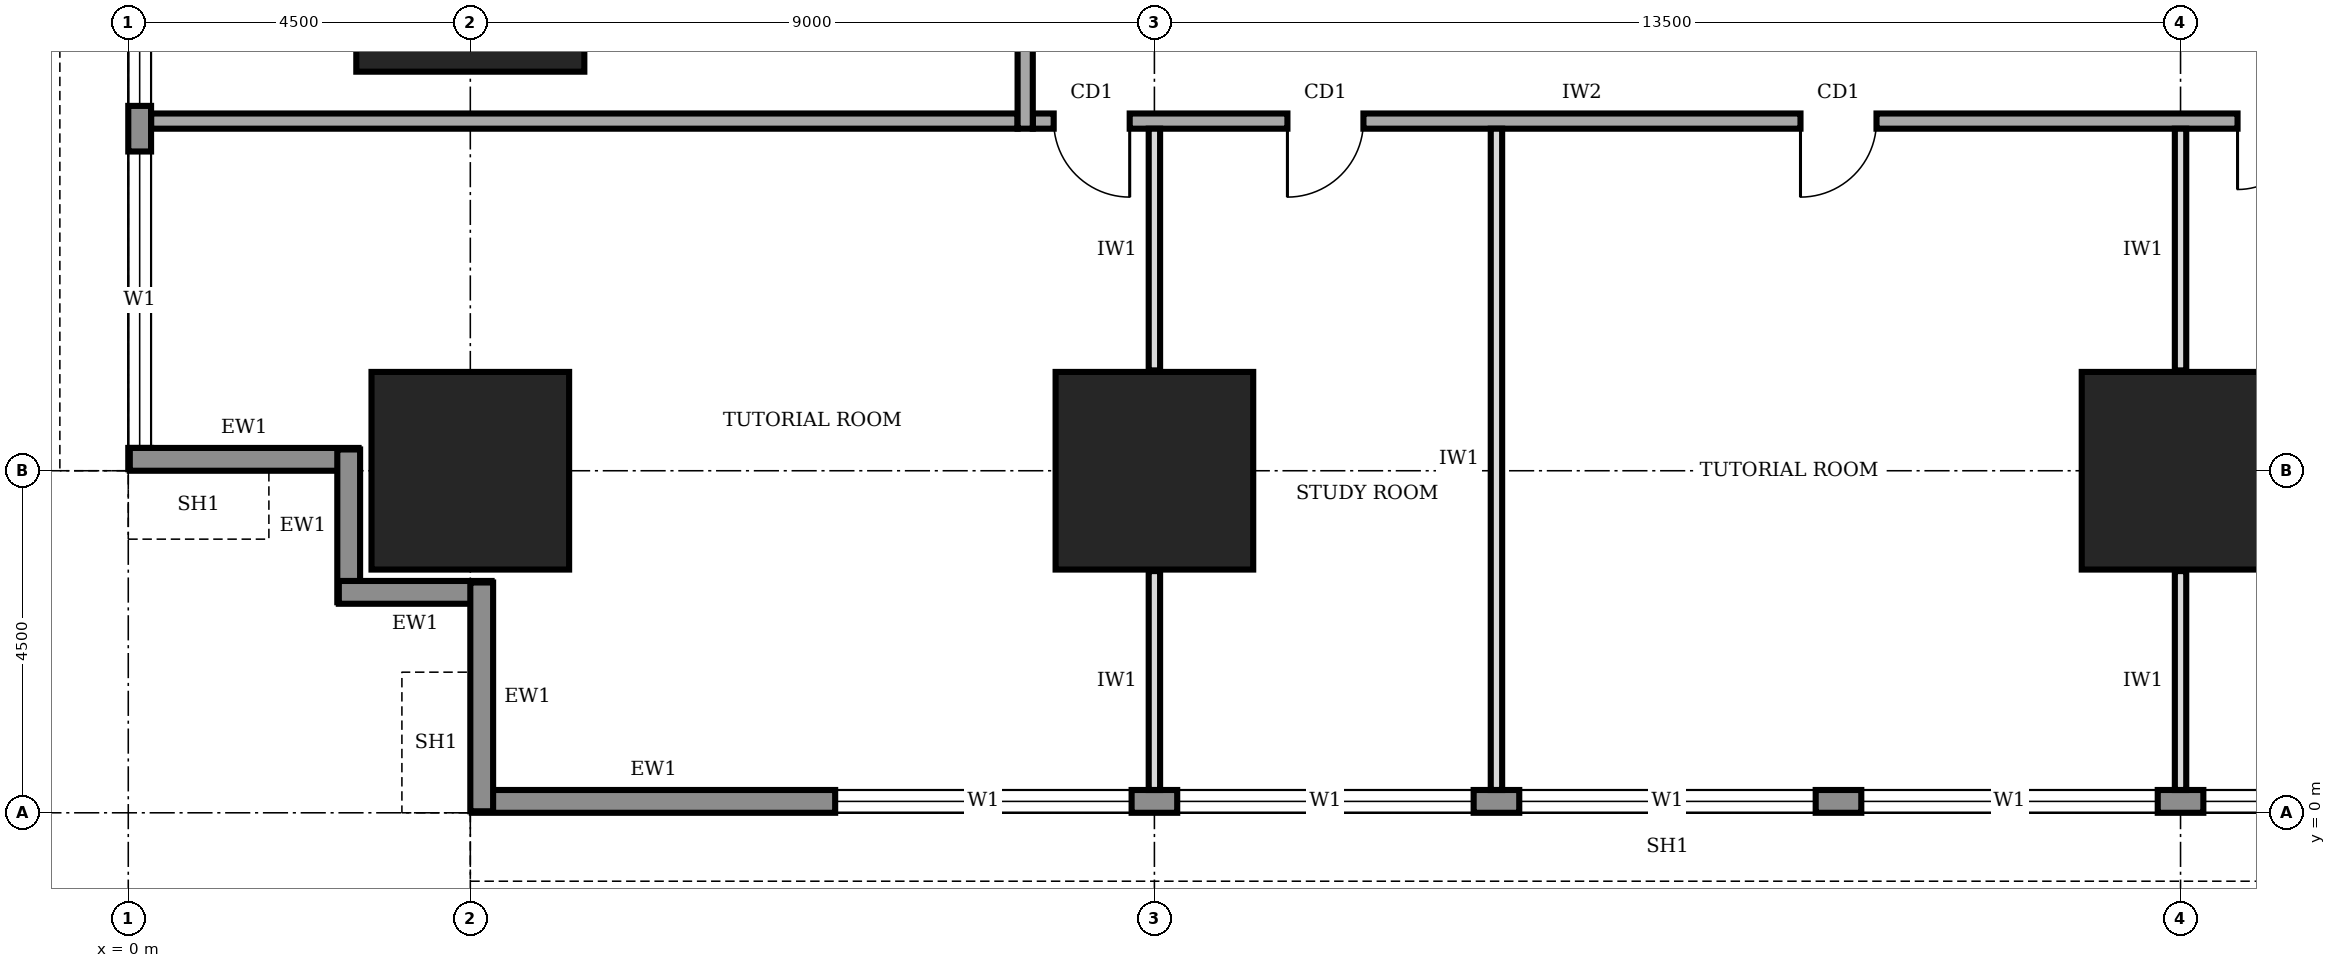
"""IFC4 building model, lengths in metres.
Left out: names, types, materials, properties, quantities, classifications, styles, units other than length and angle.
Written with IfcOpenShell. Run it as: python <this file> out.ifc"""

import sys

from ifc_helpers import new_model, si_unit, direction, frame, frame_2d, origin, origin_2d, place, context, subcontext, project, spatial, rectangle, extrude, element, fill, save


model = new_model("IFC4")
c1 = context("Model", 3, precision=1e-05, world=origin(), true_north=direction((0.0, 1.0)))
c2 = subcontext(c1, "Body", "Model", "MODEL_VIEW")
j1 = project(units=[si_unit("LENGTHUNIT", "METRE"), si_unit("PLANEANGLEUNIT", "RADIAN")], contexts=[c1])
p1 = place(None, origin())
s1 = spatial("IfcSite", under=j1, at=p1, CompositionType="ELEMENT")
p2 = place(p1, origin())
s2 = spatial("IfcBuilding", under=s1, at=p2, CompositionType="ELEMENT")
p3 = place(p2, frame((0.0, 0.0, 41.0)))
s3 = spatial("IfcBuildingStorey", under=s2, at=p3, CompositionType="ELEMENT", Elevation=41.0)
for number, where, z_axis, x_axis in (
    (1, (4.5, 4.5, 0.0), (0.0, 0.0, 1.0), (1.0, 0.0, 0.0)),
    (2, (13.5, 4.5, 0.0), (0.0, 0.0, 1.0), (1.0, 0.0, 0.0)),
    (3, (27.0, 4.5, 0.0), (0.0, 0.0, 1.0), (1.0, 0.0, 0.0)),
):
    element("IfcColumn", number, at=place(p3, frame(where, z_axis=z_axis, x_axis=x_axis)), inside=s3, PredefinedType="COLUMN", context=c2, shape_type="SweptSolid", body=[
        extrude(rectangle(XDim=2.6, YDim=2.6, at=origin_2d()), origin(), (0.0, 0.0, 1.0), 4.0),
    ])
p4 = place(p3, frame((4.5, 11.25, 0.0), z_axis=(0.0, 0.0, 1.0), x_axis=(1.0, 0.0, 0.0)))
e4 = element("IfcColumn", 4, at=p4, inside=s3, PredefinedType="COLUMN", context=c2, shape_type="SweptSolid", body=[
    extrude(rectangle(XDim=3.0, YDim=3.0, at=origin_2d()), origin(), (0.0, 0.0, 1.0), 4.0),
])
p5 = place(p3, frame((4.52, 0.15, 0.0), z_axis=(0.0, 0.0, 1.0), x_axis=(1.0, 0.0, 0.0)))
e5 = element("IfcWall", 5, at=p5, inside=s3, PredefinedType="STANDARD", context=c2, shape_type="SweptSolid", body=[
    extrude(rectangle(XDim=31.46, YDim=0.3, at=frame_2d((15.73, 0.0))), origin(), (0.0, 0.0, 1.0), 3.75),
])
p6 = place(p5, frame((4.78, 0.0, 0.9)))
e6 = element("IfcOpeningElement", 6, at=p6, cuts=e5, PredefinedType="OPENING", context=c2, shape_type="SweptSolid", body=[
    extrude(rectangle(XDim=3.9, YDim=2.2, at=frame_2d((1.95, 1.1))), frame((0.0, 0.16, 0.0), z_axis=(0.0, -1.0, 0.0), x_axis=(1.0, 0.0, 0.0)), (0.0, 0.0, 1.0), 0.32),
])
p7 = place(p5, frame((9.28, 0.0, 0.9)))
e7 = element("IfcOpeningElement", 7, at=p7, cuts=e5, PredefinedType="OPENING", context=c2, shape_type="SweptSolid", body=[
    extrude(rectangle(XDim=3.9, YDim=2.2, at=frame_2d((1.95, 1.1))), frame((0.0, 0.16, 0.0), z_axis=(0.0, -1.0, 0.0), x_axis=(1.0, 0.0, 0.0)), (0.0, 0.0, 1.0), 0.32),
])
p8 = place(p5, frame((13.78, 0.0, 0.9)))
e8 = element("IfcOpeningElement", 8, at=p8, cuts=e5, PredefinedType="OPENING", context=c2, shape_type="SweptSolid", body=[
    extrude(rectangle(XDim=3.9, YDim=2.2, at=frame_2d((1.95, 1.1))), frame((0.0, 0.16, 0.0), z_axis=(0.0, -1.0, 0.0), x_axis=(1.0, 0.0, 0.0)), (0.0, 0.0, 1.0), 0.32),
])
p9 = place(p5, frame((18.28, 0.0, 0.9)))
e9 = element("IfcOpeningElement", 9, at=p9, cuts=e5, PredefinedType="OPENING", context=c2, shape_type="SweptSolid", body=[
    extrude(rectangle(XDim=3.9, YDim=2.2, at=frame_2d((1.95, 1.1))), frame((0.0, 0.16, 0.0), z_axis=(0.0, -1.0, 0.0), x_axis=(1.0, 0.0, 0.0)), (0.0, 0.0, 1.0), 0.32),
])
p10 = place(p5, frame((22.78, 0.0, 0.9)))
e10 = element("IfcOpeningElement", 10, at=p10, cuts=e5, PredefinedType="OPENING", context=c2, shape_type="SweptSolid", body=[
    extrude(rectangle(XDim=3.9, YDim=2.2, at=frame_2d((1.95, 1.1))), frame((0.0, 0.16, 0.0), z_axis=(0.0, -1.0, 0.0), x_axis=(1.0, 0.0, 0.0)), (0.0, 0.0, 1.0), 0.32),
])
p11 = place(p5, frame((27.28, 0.0, 0.9)))
e11 = element("IfcOpeningElement", 11, at=p11, cuts=e5, PredefinedType="OPENING", context=c2, shape_type="SweptSolid", body=[
    extrude(rectangle(XDim=3.9, YDim=2.2, at=frame_2d((1.95, 1.1))), frame((0.0, 0.16, 0.0), z_axis=(0.0, -1.0, 0.0), x_axis=(1.0, 0.0, 0.0)), (0.0, 0.0, 1.0), 0.32),
])
p12 = place(p3, frame((0.15, 35.98, 0.0), z_axis=(0.0, 0.0, 1.0), x_axis=(0.0, -1.0, 0.0)))
e12 = element("IfcWall", 12, at=p12, inside=s3, PredefinedType="STANDARD", context=c2, shape_type="SweptSolid", body=[
    extrude(rectangle(XDim=31.46, YDim=0.3, at=frame_2d((15.73, 0.0))), origin(), (0.0, 0.0, 1.0), 3.75),
])
p13 = place(p12, frame((27.28, 0.0, 0.9)))
e13 = element("IfcOpeningElement", 13, at=p13, cuts=e12, PredefinedType="OPENING", context=c2, shape_type="SweptSolid", body=[
    extrude(rectangle(XDim=3.9, YDim=2.2, at=frame_2d((1.95, 1.1))), frame((0.0, 0.16, 0.0), z_axis=(0.0, -1.0, 0.0), x_axis=(1.0, 0.0, 0.0)), (0.0, 0.0, 1.0), 0.32),
])
p14 = place(p12, frame((22.78, 0.0, 0.9)))
e14 = element("IfcOpeningElement", 14, at=p14, cuts=e12, PredefinedType="OPENING", context=c2, shape_type="SweptSolid", body=[
    extrude(rectangle(XDim=3.9, YDim=2.2, at=frame_2d((1.95, 1.1))), frame((0.0, 0.16, 0.0), z_axis=(0.0, -1.0, 0.0), x_axis=(1.0, 0.0, 0.0)), (0.0, 0.0, 1.0), 0.32),
])
p15 = place(p12, frame((18.28, 0.0, 0.9)))
e15 = element("IfcOpeningElement", 15, at=p15, cuts=e12, PredefinedType="OPENING", context=c2, shape_type="SweptSolid", body=[
    extrude(rectangle(XDim=3.9, YDim=2.2, at=frame_2d((1.95, 1.1))), frame((0.0, 0.16, 0.0), z_axis=(0.0, -1.0, 0.0), x_axis=(1.0, 0.0, 0.0)), (0.0, 0.0, 1.0), 0.32),
])
p16 = place(p12, frame((13.78, 0.0, 0.9)))
e16 = element("IfcOpeningElement", 16, at=p16, cuts=e12, PredefinedType="OPENING", context=c2, shape_type="SweptSolid", body=[
    extrude(rectangle(XDim=3.9, YDim=2.2, at=frame_2d((1.95, 1.1))), frame((0.0, 0.16, 0.0), z_axis=(0.0, -1.0, 0.0), x_axis=(1.0, 0.0, 0.0)), (0.0, 0.0, 1.0), 0.32),
])
p17 = place(p12, frame((9.28, 0.0, 0.9)))
e17 = element("IfcOpeningElement", 17, at=p17, cuts=e12, PredefinedType="OPENING", context=c2, shape_type="SweptSolid", body=[
    extrude(rectangle(XDim=3.9, YDim=2.2, at=frame_2d((1.95, 1.1))), frame((0.0, 0.16, 0.0), z_axis=(0.0, -1.0, 0.0), x_axis=(1.0, 0.0, 0.0)), (0.0, 0.0, 1.0), 0.32),
])
p18 = place(p12, frame((4.78, 0.0, 0.9)))
e18 = element("IfcOpeningElement", 18, at=p18, cuts=e12, PredefinedType="OPENING", context=c2, shape_type="SweptSolid", body=[
    extrude(rectangle(XDim=3.9, YDim=2.2, at=frame_2d((1.95, 1.1))), frame((0.0, 0.16, 0.0), z_axis=(0.0, -1.0, 0.0), x_axis=(1.0, 0.0, 0.0)), (0.0, 0.0, 1.0), 0.32),
])
p19 = place(p3, frame((0.02, 4.65, 0.0), z_axis=(0.0, 0.0, 1.0), x_axis=(1.0, 0.0, 0.0)))
e19 = element("IfcWall", 19, at=p19, inside=s3, PredefinedType="STANDARD", context=c2, shape_type="SweptSolid", body=[
    extrude(rectangle(XDim=3.01, YDim=0.3, at=frame_2d((1.505, 0.0))), origin(), (0.0, 0.0, 1.0), 2.85),
])
for number, where, z_axis, x_axis in (
    (20, (2.9, 4.78, 0.0), (0.0, 0.0, 1.0), (0.0, -1.0, 0.0)),
    (21, (2.77, 2.9, 0.0), (0.0, 0.0, 1.0), (1.0, 0.0, 0.0)),
):
    element("IfcWall", number, at=place(p3, frame(where, z_axis=z_axis, x_axis=x_axis)), inside=s3, PredefinedType="STANDARD", context=c2, shape_type="SweptSolid", body=[
        extrude(rectangle(XDim=2.01, YDim=0.3, at=frame_2d((1.005, 0.0))), origin(), (0.0, 0.0, 1.0), 3.75),
    ])
p20 = place(p3, frame((4.65, 3.03, 0.0), z_axis=(0.0, 0.0, 1.0), x_axis=(0.0, -1.0, 0.0)))
e22 = element("IfcWall", 22, at=p20, inside=s3, PredefinedType="STANDARD", context=c2, shape_type="SweptSolid", body=[
    extrude(rectangle(XDim=3.01, YDim=0.3, at=frame_2d((1.505, 0.0))), origin(), (0.0, 0.0, 1.0), 2.85),
])
p21 = place(p3, frame((11.9, 9.1, 0.0), z_axis=(0.0, 0.0, 1.0), x_axis=(1.0, 0.0, 0.0)))
e23 = element("IfcWall", 23, at=p21, inside=s3, PredefinedType="SOLIDWALL", context=c2, shape_type="SweptSolid", body=[
    extrude(rectangle(XDim=18.4, YDim=0.2, at=frame_2d((9.2, 0.0))), origin(), (0.0, 0.0, 1.0), 3.75),
])
p22 = place(p21, frame((0.275, 0.0, 0.0)))
e24 = element("IfcOpeningElement", 24, at=p22, cuts=e23, PredefinedType="OPENING", context=c2, shape_type="SweptSolid", body=[
    extrude(rectangle(XDim=1.0, YDim=2.1, at=frame_2d((0.5, 1.05))), frame((0.0, 0.11, 0.0), z_axis=(0.0, -1.0, 0.0), x_axis=(1.0, 0.0, 0.0)), (0.0, 0.0, 1.0), 0.22),
])
p23 = place(p21, frame((3.35, 0.0, 0.0)))
e25 = element("IfcOpeningElement", 25, at=p23, cuts=e23, PredefinedType="OPENING", context=c2, shape_type="SweptSolid", body=[
    extrude(rectangle(XDim=1.0, YDim=2.1, at=frame_2d((0.5, 1.05))), frame((0.0, 0.11, 0.0), z_axis=(0.0, -1.0, 0.0), x_axis=(1.0, 0.0, 0.0)), (0.0, 0.0, 1.0), 0.22),
])
p24 = place(p21, frame((10.1, 0.0, 0.0)))
e26 = element("IfcOpeningElement", 26, at=p24, cuts=e23, PredefinedType="OPENING", context=c2, shape_type="SweptSolid", body=[
    extrude(rectangle(XDim=1.0, YDim=2.1, at=frame_2d((0.5, 1.05))), frame((0.0, 0.11, 0.0), z_axis=(0.0, -1.0, 0.0), x_axis=(1.0, 0.0, 0.0)), (0.0, 0.0, 1.0), 0.22),
])
p25 = place(p21, frame((15.85, 0.0, 0.0)))
e27 = element("IfcOpeningElement", 27, at=p25, cuts=e23, PredefinedType="OPENING", context=c2, shape_type="SweptSolid", body=[
    extrude(rectangle(XDim=1.8, YDim=2.1, at=frame_2d((0.9, 1.05))), frame((0.0, 0.11, 0.0), z_axis=(0.0, -1.0, 0.0), x_axis=(1.0, 0.0, 0.0)), (0.0, 0.0, 1.0), 0.22),
])
p26 = place(p3, frame((11.8, 31.3, 0.0), z_axis=(0.0, 0.0, 1.0), x_axis=(0.0, -1.0, 0.0)))
e28 = element("IfcWall", 28, at=p26, inside=s3, PredefinedType="SOLIDWALL", context=c2, shape_type="SweptSolid", body=[
    extrude(rectangle(XDim=22.3, YDim=0.2, at=frame_2d((11.15, 0.0))), origin(), (0.0, 0.0, 1.0), 3.75),
])
p27 = place(p26, frame((19.55, 0.0, 0.0)))
e29 = element("IfcOpeningElement", 29, at=p27, cuts=e28, PredefinedType="OPENING", context=c2, shape_type="SweptSolid", body=[
    extrude(rectangle(XDim=1.0, YDim=2.1, at=frame_2d((0.5, 1.05))), frame((0.0, 0.11, 0.0), z_axis=(0.0, -1.0, 0.0), x_axis=(1.0, 0.0, 0.0)), (0.0, 0.0, 1.0), 0.22),
])
p28 = place(p26, frame((16.15, 0.0, 0.0)))
e30 = element("IfcOpeningElement", 30, at=p28, cuts=e28, PredefinedType="OPENING", context=c2, shape_type="SweptSolid", body=[
    extrude(rectangle(XDim=0.9, YDim=2.1, at=frame_2d((0.45, 1.05))), frame((0.0, 0.11, 0.0), z_axis=(0.0, -1.0, 0.0), x_axis=(1.0, 0.0, 0.0)), (0.0, 0.0, 1.0), 0.22),
])
p29 = place(p26, frame((12.95, 0.0, 0.0)))
e31 = element("IfcOpeningElement", 31, at=p29, cuts=e28, PredefinedType="OPENING", context=c2, shape_type="SweptSolid", body=[
    extrude(rectangle(XDim=0.9, YDim=2.1, at=frame_2d((0.45, 1.05))), frame((0.0, 0.11, 0.0), z_axis=(0.0, -1.0, 0.0), x_axis=(1.0, 0.0, 0.0)), (0.0, 0.0, 1.0), 0.22),
])
p30 = place(p26, frame((7.4, 0.0, 0.0)))
e32 = element("IfcOpeningElement", 32, at=p30, cuts=e28, PredefinedType="OPENING", context=c2, shape_type="SweptSolid", body=[
    extrude(rectangle(XDim=0.9, YDim=2.1, at=frame_2d((0.45, 1.05))), frame((0.0, 0.11, 0.0), z_axis=(0.0, -1.0, 0.0), x_axis=(1.0, 0.0, 0.0)), (0.0, 0.0, 1.0), 0.22),
])
p31 = place(p26, frame((4.8, 0.0, 0.0)))
e33 = element("IfcOpeningElement", 33, at=p31, cuts=e28, PredefinedType="OPENING", context=c2, shape_type="SweptSolid", body=[
    extrude(rectangle(XDim=1.0, YDim=2.1, at=frame_2d((0.5, 1.05))), frame((0.0, 0.11, 0.0), z_axis=(0.0, -1.0, 0.0), x_axis=(1.0, 0.0, 0.0)), (0.0, 0.0, 1.0), 0.22),
])
p32 = place(p26, frame((9.9, 0.0, 0.0)))
e34 = element("IfcOpeningElement", 34, at=p32, cuts=e28, PredefinedType="OPENING", context=c2, shape_type="SweptSolid", body=[
    extrude(rectangle(XDim=1.0, YDim=2.1, at=frame_2d((0.5, 1.05))), frame((0.0, 0.11, 0.0), z_axis=(0.0, -1.0, 0.0), x_axis=(1.0, 0.0, 0.0)), (0.0, 0.0, 1.0), 0.22),
])
p33 = place(p26, frame((1.55, 0.0, 0.0)))
e35 = element("IfcOpeningElement", 35, at=p33, cuts=e28, PredefinedType="OPENING", context=c2, shape_type="SweptSolid", body=[
    extrude(rectangle(XDim=1.0, YDim=2.1, at=frame_2d((0.5, 1.05))), frame((0.0, 0.11, 0.0), z_axis=(0.0, -1.0, 0.0), x_axis=(1.0, 0.0, 0.0)), (0.0, 0.0, 1.0), 0.22),
])
p34 = place(p3, frame((0.3, 9.1, 0.0), z_axis=(0.0, 0.0, 1.0), x_axis=(1.0, 0.0, 0.0)))
e36 = element("IfcWall", 36, at=p34, inside=s3, PredefinedType="SOLIDWALL", context=c2, shape_type="SweptSolid", body=[
    extrude(rectangle(XDim=11.4, YDim=0.2, at=frame_2d((5.7, 0.0))), origin(), (0.0, 0.0, 1.0), 3.75),
])
p35 = place(p3, frame((13.5, 0.3, 0.0), z_axis=(0.0, 0.0, 1.0), x_axis=(0.0, 1.0, 0.0)))
e37 = element("IfcWall", 37, at=p35, inside=s3, PredefinedType="PARTITIONING", context=c2, shape_type="SweptSolid", body=[
    extrude(rectangle(XDim=2.88, YDim=0.15, at=frame_2d((1.44, 0.0))), origin(), (0.0, 0.0, 1.0), 2.85),
])
p36 = place(p3, frame((13.5, 5.82, 0.0), z_axis=(0.0, 0.0, 1.0), x_axis=(0.0, 1.0, 0.0)))
e38 = element("IfcWall", 38, at=p36, inside=s3, PredefinedType="PARTITIONING", context=c2, shape_type="SweptSolid", body=[
    extrude(rectangle(XDim=3.18, YDim=0.15, at=frame_2d((1.59, 0.0))), origin(), (0.0, 0.0, 1.0), 2.85),
])
p37 = place(p3, frame((18.0, 0.3, 0.0), z_axis=(0.0, 0.0, 1.0), x_axis=(0.0, 1.0, 0.0)))
e39 = element("IfcWall", 39, at=p37, inside=s3, PredefinedType="PARTITIONING", context=c2, shape_type="SweptSolid", body=[
    extrude(rectangle(XDim=8.7, YDim=0.15, at=frame_2d((4.35, 0.0))), origin(), (0.0, 0.0, 1.0), 3.75),
])
p38 = place(p3, frame((27.0, 0.3, 0.0), z_axis=(0.0, 0.0, 1.0), x_axis=(0.0, 1.0, 0.0)))
e40 = element("IfcWall", 40, at=p38, inside=s3, PredefinedType="PARTITIONING", context=c2, shape_type="SweptSolid", body=[
    extrude(rectangle(XDim=2.88, YDim=0.15, at=frame_2d((1.44, 0.0))), origin(), (0.0, 0.0, 1.0), 2.85),
])
p39 = place(p3, frame((27.0, 5.82, 0.0), z_axis=(0.0, 0.0, 1.0), x_axis=(0.0, 1.0, 0.0)))
e41 = element("IfcWall", 41, at=p39, inside=s3, PredefinedType="PARTITIONING", context=c2, shape_type="SweptSolid", body=[
    extrude(rectangle(XDim=3.18, YDim=0.15, at=frame_2d((1.59, 0.0))), origin(), (0.0, 0.0, 1.0), 2.85),
])
p40 = place(p6, origin())
e42 = element("IfcWindow", 42, at=p40, inside=s3, PartitioningType="SINGLE_PANEL", PredefinedType="WINDOW", context=c2, shape_type="SweptSolid", body=[
    extrude(rectangle(XDim=3.9, YDim=2.2, at=frame_2d((1.95, 1.1))), frame((0.0, 0.03, 0.0), z_axis=(0.0, -1.0, 0.0), x_axis=(1.0, 0.0, 0.0)), (0.0, 0.0, 1.0), 0.06),
])
fill(e6, e42)
p41 = place(p7, origin())
e43 = element("IfcWindow", 43, at=p41, inside=s3, PartitioningType="SINGLE_PANEL", PredefinedType="WINDOW", context=c2, shape_type="SweptSolid", body=[
    extrude(rectangle(XDim=3.9, YDim=2.2, at=frame_2d((1.95, 1.1))), frame((0.0, 0.03, 0.0), z_axis=(0.0, -1.0, 0.0), x_axis=(1.0, 0.0, 0.0)), (0.0, 0.0, 1.0), 0.06),
])
fill(e7, e43)
p42 = place(p8, origin())
e44 = element("IfcWindow", 44, at=p42, inside=s3, PartitioningType="SINGLE_PANEL", PredefinedType="WINDOW", context=c2, shape_type="SweptSolid", body=[
    extrude(rectangle(XDim=3.9, YDim=2.2, at=frame_2d((1.95, 1.1))), frame((0.0, 0.03, 0.0), z_axis=(0.0, -1.0, 0.0), x_axis=(1.0, 0.0, 0.0)), (0.0, 0.0, 1.0), 0.06),
])
fill(e8, e44)
p43 = place(p9, origin())
e45 = element("IfcWindow", 45, at=p43, inside=s3, PartitioningType="SINGLE_PANEL", PredefinedType="WINDOW", context=c2, shape_type="SweptSolid", body=[
    extrude(rectangle(XDim=3.9, YDim=2.2, at=frame_2d((1.95, 1.1))), frame((0.0, 0.03, 0.0), z_axis=(0.0, -1.0, 0.0), x_axis=(1.0, 0.0, 0.0)), (0.0, 0.0, 1.0), 0.06),
])
fill(e9, e45)
p44 = place(p10, origin())
e46 = element("IfcWindow", 46, at=p44, inside=s3, PartitioningType="SINGLE_PANEL", PredefinedType="WINDOW", context=c2, shape_type="SweptSolid", body=[
    extrude(rectangle(XDim=3.9, YDim=2.2, at=frame_2d((1.95, 1.1))), frame((0.0, 0.03, 0.0), z_axis=(0.0, -1.0, 0.0), x_axis=(1.0, 0.0, 0.0)), (0.0, 0.0, 1.0), 0.06),
])
fill(e10, e46)
p45 = place(p13, origin())
e47 = element("IfcWindow", 47, at=p45, inside=s3, PartitioningType="SINGLE_PANEL", PredefinedType="WINDOW", context=c2, shape_type="SweptSolid", body=[
    extrude(rectangle(XDim=3.9, YDim=2.2, at=frame_2d((1.95, 1.1))), frame((0.0, 0.03, 0.0), z_axis=(0.0, -1.0, 0.0), x_axis=(1.0, 0.0, 0.0)), (0.0, 0.0, 1.0), 0.06),
])
fill(e13, e47)
p46 = place(p14, origin())
e48 = element("IfcWindow", 48, at=p46, inside=s3, PartitioningType="SINGLE_PANEL", PredefinedType="WINDOW", context=c2, shape_type="SweptSolid", body=[
    extrude(rectangle(XDim=3.9, YDim=2.2, at=frame_2d((1.95, 1.1))), frame((0.0, 0.03, 0.0), z_axis=(0.0, -1.0, 0.0), x_axis=(1.0, 0.0, 0.0)), (0.0, 0.0, 1.0), 0.06),
])
fill(e14, e48)
p47 = place(p22, frame((1.0, 0.0, 0.0), z_axis=(0.0, 0.0, 1.0), x_axis=(-1.0, 0.0, 0.0)))
e49 = element("IfcDoor", 49, at=p47, inside=s3, OperationType="SINGLE_SWING_LEFT", PredefinedType="DOOR", context=c2, shape_type="SweptSolid", body=[
    extrude(rectangle(XDim=1.0, YDim=2.1, at=frame_2d((0.5, 1.05))), frame((0.0, 0.025, 0.0), z_axis=(0.0, -1.0, 0.0), x_axis=(1.0, 0.0, 0.0)), (0.0, 0.0, 1.0), 0.05),
])
fill(e24, e49)
p48 = place(p23, frame((1.0, 0.0, 0.0), z_axis=(0.0, 0.0, 1.0), x_axis=(-1.0, 0.0, 0.0)))
e50 = element("IfcDoor", 50, at=p48, inside=s3, OperationType="SINGLE_SWING_RIGHT", PredefinedType="DOOR", context=c2, shape_type="SweptSolid", body=[
    extrude(rectangle(XDim=1.0, YDim=2.1, at=frame_2d((0.5, 1.05))), frame((0.0, 0.025, 0.0), z_axis=(0.0, -1.0, 0.0), x_axis=(1.0, 0.0, 0.0)), (0.0, 0.0, 1.0), 0.05),
])
fill(e25, e50)
p49 = place(p24, frame((1.0, 0.0, 0.0), z_axis=(0.0, 0.0, 1.0), x_axis=(-1.0, 0.0, 0.0)))
e51 = element("IfcDoor", 51, at=p49, inside=s3, OperationType="SINGLE_SWING_RIGHT", PredefinedType="DOOR", context=c2, shape_type="SweptSolid", body=[
    extrude(rectangle(XDim=1.0, YDim=2.1, at=frame_2d((0.5, 1.05))), frame((0.0, 0.025, 0.0), z_axis=(0.0, -1.0, 0.0), x_axis=(1.0, 0.0, 0.0)), (0.0, 0.0, 1.0), 0.05),
])
fill(e26, e51)
p50 = place(p25, frame((1.8, 0.0, 0.0), z_axis=(0.0, 0.0, 1.0), x_axis=(-1.0, 0.0, 0.0)))
e52 = element("IfcDoor", 52, at=p50, inside=s3, OperationType="DOUBLE_DOOR_SINGLE_SWING", PredefinedType="DOOR", context=c2, shape_type="SweptSolid", body=[
    extrude(rectangle(XDim=1.8, YDim=2.1, at=frame_2d((0.9, 1.05))), frame((0.0, 0.025, 0.0), z_axis=(0.0, -1.0, 0.0), x_axis=(1.0, 0.0, 0.0)), (0.0, 0.0, 1.0), 0.05),
])
fill(e27, e52)
save(model, sys.argv[1])
